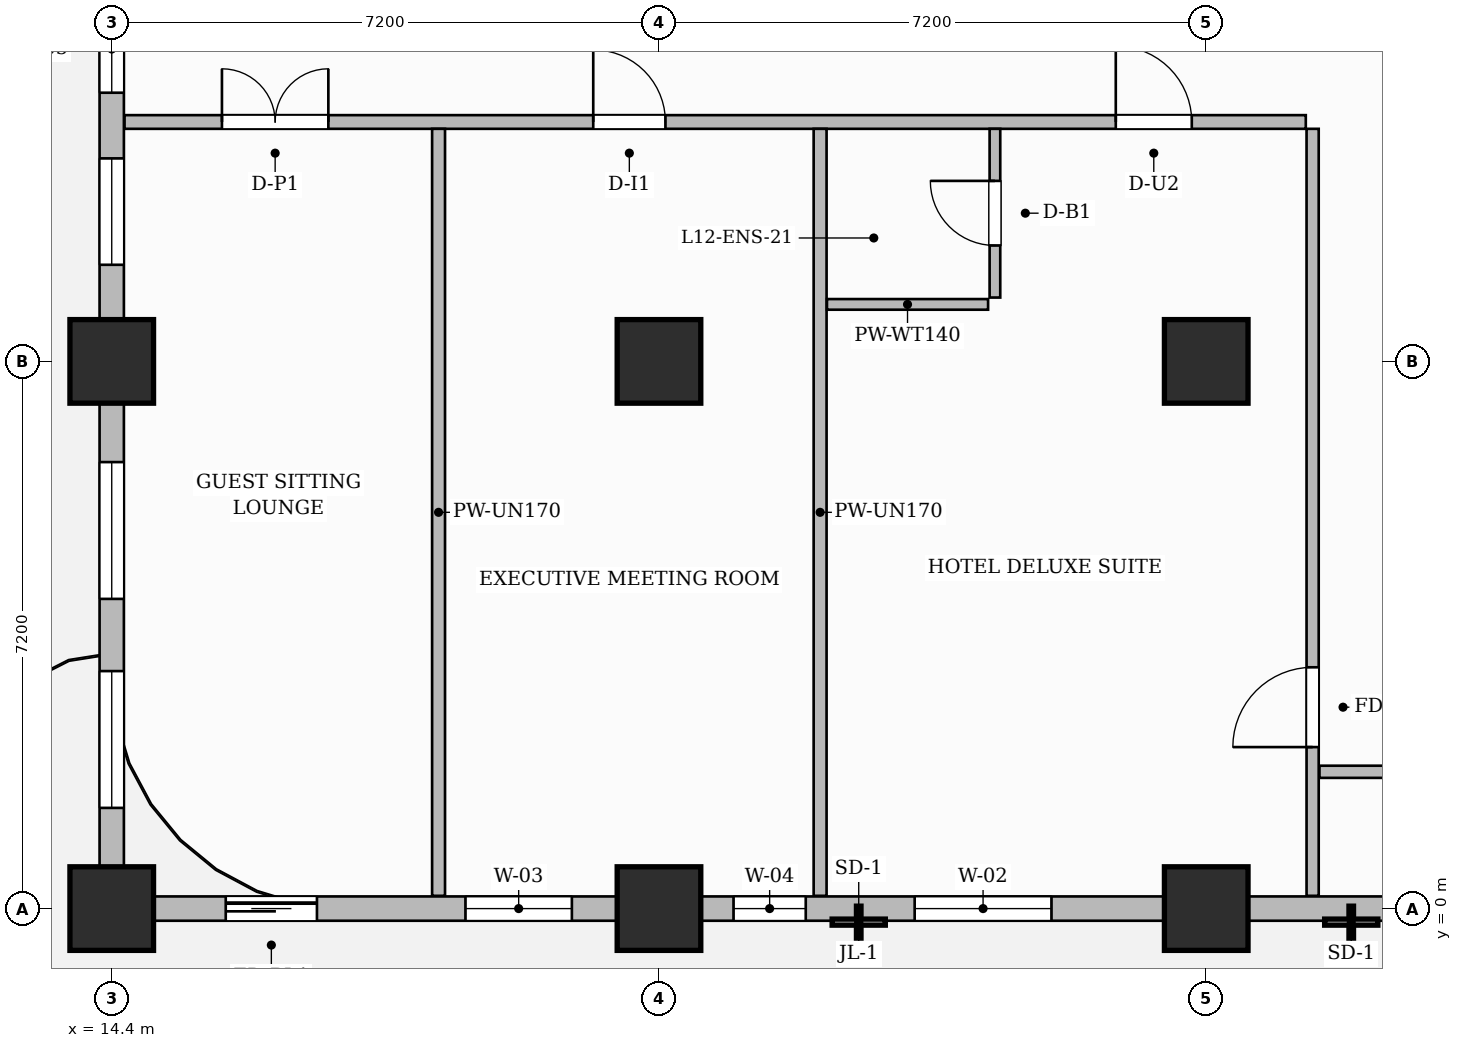
"""IFC4 building model, lengths in metres.
Left out: names, types, materials, properties, quantities, classifications, styles, units other than length and angle.
Written with IfcOpenShell. Run it as: python <this file> out.ifc"""

import sys

from ifc_helpers import new_model, si_unit, direction, frame, frame_2d, origin, origin_2d, place, context, subcontext, project, spatial, rectangle, extrude, source, transform, mapped, element, fill, save


model = new_model("IFC4")
c1 = context("Model", 3, precision=1e-05, world=origin(), true_north=direction((0.0, 1.0)))
c2 = subcontext(c1, "Body", "Model", "MODEL_VIEW")
j1 = project(units=[si_unit("LENGTHUNIT", "METRE"), si_unit("PLANEANGLEUNIT", "RADIAN")], contexts=[c1])
p1 = place(None, origin())
s1 = spatial("IfcSite", under=j1, at=p1, CompositionType="ELEMENT")
p2 = place(p1, origin())
s2 = spatial("IfcBuilding", under=s1, at=p2, CompositionType="ELEMENT")
p3 = place(p2, frame((0.0, 0.0, 54.6)))
s3 = spatial("IfcBuildingStorey", under=s2, at=p3, CompositionType="ELEMENT", Elevation=54.6)
m1 = source(origin(), c2, "Body", "SweptSolid", [
    extrude(rectangle(XDim=1.1, YDim=1.1, at=origin_2d()), origin(), (0.0, 0.0, 1.0), 3.7),
])
for number, where, z_axis, x_axis in (
    (1, (14.4, 0.0, 0.0), (0.0, 0.0, 1.0), (1.0, 0.0, 0.0)),
    (2, (14.4, 7.2, 0.0), (0.0, 0.0, 1.0), (1.0, 0.0, 0.0)),
    (3, (21.6, 0.0, 0.0), (0.0, 0.0, 1.0), (1.0, 0.0, 0.0)),
    (4, (21.6, 7.2, 0.0), (0.0, 0.0, 1.0), (1.0, 0.0, 0.0)),
    (5, (28.8, 0.0, 0.0), (0.0, 0.0, 1.0), (1.0, 0.0, 0.0)),
    (6, (28.8, 7.2, 0.0), (0.0, 0.0, 1.0), (1.0, 0.0, 0.0)),
):
    element("IfcColumn", number, at=place(p3, frame(where, z_axis=z_axis, x_axis=x_axis)), inside=s3, PredefinedType="COLUMN", context=c2, shape_type="MappedRepresentation", body=[
        mapped(m1, transform((0.0, 0.0, 0.0), scale=1.0)),
    ])
p4 = place(p3, frame((14.568, 10.35, 0.0), z_axis=(0.0, 0.0, 1.0), x_axis=(1.0, 0.0, 0.0)))
e7 = element("IfcWall", 7, at=p4, inside=s3, PredefinedType="PARTITIONING", context=c2, shape_type="SweptSolid", body=[
    extrude(rectangle(XDim=15.542, YDim=0.18, at=frame_2d((7.771, 0.0))), origin(), (0.0, 0.0, 1.0), 3.45),
])
p5 = place(p4, frame((1.282, 0.0, 0.0)))
e8 = element("IfcOpeningElement", 8, at=p5, cuts=e7, PredefinedType="OPENING", context=c2, shape_type="SweptSolid", body=[
    extrude(rectangle(XDim=1.4, YDim=2.35, at=frame_2d((0.7, 1.175))), frame((0.0, 0.1, 0.0), z_axis=(0.0, -1.0, 0.0), x_axis=(1.0, 0.0, 0.0)), (0.0, 0.0, 1.0), 0.2),
])
p6 = place(p4, frame((6.167, 0.0, 0.0)))
e9 = element("IfcOpeningElement", 9, at=p6, cuts=e7, PredefinedType="OPENING", context=c2, shape_type="SweptSolid", body=[
    extrude(rectangle(XDim=0.95, YDim=2.15, at=frame_2d((0.475, 1.075))), frame((0.0, 0.1, 0.0), z_axis=(0.0, -1.0, 0.0), x_axis=(1.0, 0.0, 0.0)), (0.0, 0.0, 1.0), 0.2),
])
p7 = place(p4, frame((13.042, 0.0, 0.0)))
e10 = element("IfcOpeningElement", 10, at=p7, cuts=e7, PredefinedType="OPENING", context=c2, shape_type="SweptSolid", body=[
    extrude(rectangle(XDim=1.0, YDim=2.2, at=frame_2d((0.5, 1.1))), frame((0.0, 0.1, 0.0), z_axis=(0.0, -1.0, 0.0), x_axis=(1.0, 0.0, 0.0)), (0.0, 0.0, 1.0), 0.2),
])
p8 = place(p3, frame((30.2, 0.168, 0.0), z_axis=(0.0, 0.0, 1.0), x_axis=(0.0, 1.0, 0.0)))
e11 = element("IfcWall", 11, at=p8, inside=s3, PredefinedType="PARTITIONING", context=c2, shape_type="SweptSolid", body=[
    extrude(rectangle(XDim=10.092, YDim=0.16, at=frame_2d((5.046, 0.0))), origin(), (0.0, 0.0, 1.0), 3.45),
])
p9 = place(p8, frame((1.957, 0.0, 0.0)))
e12 = element("IfcOpeningElement", 12, at=p9, cuts=e11, PredefinedType="OPENING", context=c2, shape_type="SweptSolid", body=[
    extrude(rectangle(XDim=1.05, YDim=2.15, at=frame_2d((0.525, 1.075))), frame((0.0, 0.09, 0.0), z_axis=(0.0, -1.0, 0.0), x_axis=(1.0, 0.0, 0.0)), (0.0, 0.0, 1.0), 0.18),
])
p10 = place(p3, frame((30.29, 1.8, 0.0), z_axis=(0.0, 0.0, 1.0), x_axis=(1.0, 0.0, 0.0)))
e13 = element("IfcWall", 13, at=p10, inside=s3, PredefinedType="PARTITIONING", context=c2, shape_type="SweptSolid", body=[
    extrude(rectangle(XDim=19.37, YDim=0.16, at=frame_2d((9.685, 0.0))), origin(), (0.0, 0.0, 1.0), 3.45),
])
p11 = place(p10, frame((2.916, 0.0, 0.0)))
e14 = element("IfcOpeningElement", 14, at=p11, cuts=e13, PredefinedType="OPENING", context=c2, shape_type="SweptSolid", body=[
    extrude(rectangle(XDim=0.9, YDim=2.15, at=frame_2d((0.45, 1.075))), frame((0.0, 0.09, 0.0), z_axis=(0.0, -1.0, 0.0), x_axis=(1.0, 0.0, 0.0)), (0.0, 0.0, 1.0), 0.18),
])
p12 = place(p10, frame((9.66, 0.0, 0.0)))
e15 = element("IfcOpeningElement", 15, at=p12, cuts=e13, PredefinedType="OPENING", context=c2, shape_type="SweptSolid", body=[
    extrude(rectangle(XDim=0.9, YDim=2.15, at=frame_2d((0.45, 1.075))), frame((0.0, 0.09, 0.0), z_axis=(0.0, -1.0, 0.0), x_axis=(1.0, 0.0, 0.0)), (0.0, 0.0, 1.0), 0.18),
])
p13 = place(p10, frame((15.86, 0.0, 0.0)))
e16 = element("IfcOpeningElement", 16, at=p13, cuts=e13, PredefinedType="OPENING", context=c2, shape_type="SweptSolid", body=[
    extrude(rectangle(XDim=0.9, YDim=2.15, at=frame_2d((0.45, 1.075))), frame((0.0, 0.09, 0.0), z_axis=(0.0, -1.0, 0.0), x_axis=(1.0, 0.0, 0.0)), (0.0, 0.0, 1.0), 0.18),
])
for number, where, z_axis, x_axis in (
    (17, (18.7, 0.168, 0.0), (0.0, 0.0, 1.0), (0.0, 1.0, 0.0)),
    (18, (23.72, 0.168, 0.0), (0.0, 0.0, 1.0), (0.0, 1.0, 0.0)),
):
    element("IfcWall", number, at=place(p3, frame(where, z_axis=z_axis, x_axis=x_axis)), inside=s3, PredefinedType="PARTITIONING", context=c2, shape_type="SweptSolid", body=[
        extrude(rectangle(XDim=10.092, YDim=0.17, at=frame_2d((5.046, 0.0))), origin(), (0.0, 0.0, 1.0), 3.45),
    ])
p14 = place(p3, frame((26.02, 8.04, 0.0), z_axis=(0.0, 0.0, 1.0), x_axis=(0.0, 1.0, 0.0)))
e19 = element("IfcWall", 19, at=p14, inside=s3, PredefinedType="PARTITIONING", context=c2, shape_type="SweptSolid", body=[
    extrude(rectangle(XDim=2.22, YDim=0.14, at=frame_2d((1.11, 0.0))), origin(), (0.0, 0.0, 1.0), 3.45),
])
p15 = place(p14, frame((0.685, 0.0, 0.0)))
e20 = element("IfcOpeningElement", 20, at=p15, cuts=e19, PredefinedType="OPENING", context=c2, shape_type="SweptSolid", body=[
    extrude(rectangle(XDim=0.85, YDim=2.1, at=frame_2d((0.425, 1.05))), frame((0.0, 0.08, 0.0), z_axis=(0.0, -1.0, 0.0), x_axis=(1.0, 0.0, 0.0)), (0.0, 0.0, 1.0), 0.16),
])
p16 = place(p3, frame((23.81, 7.95, 0.0), z_axis=(0.0, 0.0, 1.0), x_axis=(1.0, 0.0, 0.0)))
e21 = element("IfcWall", 21, at=p16, inside=s3, PredefinedType="PARTITIONING", context=c2, shape_type="SweptSolid", body=[
    extrude(rectangle(XDim=2.12, YDim=0.14, at=frame_2d((1.06, 0.0))), origin(), (0.0, 0.0, 1.0), 3.45),
])
p17 = place(p3, frame((14.4, 0.0, 0.0), z_axis=(0.0, 0.0, 1.0), x_axis=(1.0, 0.0, 0.0)))
e22 = element("IfcWall", 22, at=p17, inside=s3, PredefinedType="SOLIDWALL", context=c2, shape_type="SweptSolid", body=[
    extrude(rectangle(XDim=43.2, YDim=0.32, at=frame_2d((21.6, 0.0))), origin(), (0.0, 0.0, 1.0), 2.885),
])
p18 = place(p17, frame((1.5, 0.0, 0.0)))
e23 = element("IfcOpeningElement", 23, at=p18, cuts=e22, PredefinedType="OPENING", context=c2, shape_type="SweptSolid", body=[
    extrude(rectangle(XDim=1.2, YDim=2.2, at=frame_2d((0.6, 1.1))), frame((0.0, 0.17, 0.0), z_axis=(0.0, -1.0, 0.0), x_axis=(1.0, 0.0, 0.0)), (0.0, 0.0, 1.0), 0.34),
])
p19 = place(p17, frame((4.654, 0.0, 0.8)))
e24 = element("IfcOpeningElement", 24, at=p19, cuts=e22, PredefinedType="OPENING", context=c2, shape_type="SweptSolid", body=[
    extrude(rectangle(XDim=1.4, YDim=1.85, at=frame_2d((0.7, 0.925))), frame((0.0, 0.17, 0.0), z_axis=(0.0, -1.0, 0.0), x_axis=(1.0, 0.0, 0.0)), (0.0, 0.0, 1.0), 0.34),
])
p20 = place(p17, frame((8.181, 0.0, 0.8)))
e25 = element("IfcOpeningElement", 25, at=p20, cuts=e22, PredefinedType="OPENING", context=c2, shape_type="SweptSolid", body=[
    extrude(rectangle(XDim=0.95, YDim=1.75, at=frame_2d((0.475, 0.875))), frame((0.0, 0.17, 0.0), z_axis=(0.0, -1.0, 0.0), x_axis=(1.0, 0.0, 0.0)), (0.0, 0.0, 1.0), 0.34),
])
p21 = place(p17, frame((10.564, 0.0, 0.8)))
e26 = element("IfcOpeningElement", 26, at=p21, cuts=e22, PredefinedType="OPENING", context=c2, shape_type="SweptSolid", body=[
    extrude(rectangle(XDim=1.8, YDim=1.85, at=frame_2d((0.9, 0.925))), frame((0.0, 0.17, 0.0), z_axis=(0.0, -1.0, 0.0), x_axis=(1.0, 0.0, 0.0)), (0.0, 0.0, 1.0), 0.34),
])
p22 = place(p17, frame((16.804, 0.0, 0.8)))
e27 = element("IfcOpeningElement", 27, at=p22, cuts=e22, PredefinedType="OPENING", context=c2, shape_type="SweptSolid", body=[
    extrude(rectangle(XDim=1.8, YDim=1.85, at=frame_2d((0.9, 0.925))), frame((0.0, 0.17, 0.0), z_axis=(0.0, -1.0, 0.0), x_axis=(1.0, 0.0, 0.0)), (0.0, 0.0, 1.0), 0.34),
])
p23 = place(p17, frame((21.521, 0.0, 0.8)))
e28 = element("IfcOpeningElement", 28, at=p23, cuts=e22, PredefinedType="OPENING", context=c2, shape_type="SweptSolid", body=[
    extrude(rectangle(XDim=0.95, YDim=1.75, at=frame_2d((0.475, 0.875))), frame((0.0, 0.17, 0.0), z_axis=(0.0, -1.0, 0.0), x_axis=(1.0, 0.0, 0.0)), (0.0, 0.0, 1.0), 0.34),
])
p24 = place(p17, frame((23.904, 0.0, 0.8)))
e29 = element("IfcOpeningElement", 29, at=p24, cuts=e22, PredefinedType="OPENING", context=c2, shape_type="SweptSolid", body=[
    extrude(rectangle(XDim=1.8, YDim=1.85, at=frame_2d((0.9, 0.925))), frame((0.0, 0.17, 0.0), z_axis=(0.0, -1.0, 0.0), x_axis=(1.0, 0.0, 0.0)), (0.0, 0.0, 1.0), 0.34),
])
p25 = place(p17, frame((29.681, 0.0, 0.8)))
e30 = element("IfcOpeningElement", 30, at=p25, cuts=e22, PredefinedType="OPENING", context=c2, shape_type="SweptSolid", body=[
    extrude(rectangle(XDim=1.8, YDim=1.85, at=frame_2d((0.9, 0.925))), frame((0.0, 0.17, 0.0), z_axis=(0.0, -1.0, 0.0), x_axis=(1.0, 0.0, 0.0)), (0.0, 0.0, 1.0), 0.34),
])
p26 = place(p17, frame((32.327, 0.0, 0.8)))
e31 = element("IfcOpeningElement", 31, at=p26, cuts=e22, PredefinedType="OPENING", context=c2, shape_type="SweptSolid", body=[
    extrude(rectangle(XDim=1.8, YDim=1.85, at=frame_2d((0.9, 0.925))), frame((0.0, 0.17, 0.0), z_axis=(0.0, -1.0, 0.0), x_axis=(1.0, 0.0, 0.0)), (0.0, 0.0, 1.0), 0.34),
])
p27 = place(p17, frame((36.875, 0.0, 0.8)))
e32 = element("IfcOpeningElement", 32, at=p27, cuts=e22, PredefinedType="OPENING", context=c2, shape_type="SweptSolid", body=[
    extrude(rectangle(XDim=1.8, YDim=1.85, at=frame_2d((0.9, 0.925))), frame((0.0, 0.17, 0.0), z_axis=(0.0, -1.0, 0.0), x_axis=(1.0, 0.0, 0.0)), (0.0, 0.0, 1.0), 0.34),
])
p28 = place(p17, frame((39.925, 0.0, 0.8)))
e33 = element("IfcOpeningElement", 33, at=p28, cuts=e22, PredefinedType="OPENING", context=c2, shape_type="SweptSolid", body=[
    extrude(rectangle(XDim=1.8, YDim=1.85, at=frame_2d((0.9, 0.925))), frame((0.0, 0.17, 0.0), z_axis=(0.0, -1.0, 0.0), x_axis=(1.0, 0.0, 0.0)), (0.0, 0.0, 1.0), 0.34),
])
p29 = place(p3, frame((14.4, 0.05, 0.0), z_axis=(0.0, 0.0, 1.0), x_axis=(0.0, 1.0, 0.0)))
e34 = element("IfcWall", 34, at=p29, inside=s3, PredefinedType="SOLIDWALL", context=c2, shape_type="SweptSolid", body=[
    extrude(rectangle(XDim=21.5, YDim=0.32, at=frame_2d((10.75, 0.0))), origin(), (0.0, 0.0, 1.0), 2.885),
])
p30 = place(p29, frame((1.275, 0.0, 0.8)))
e35 = element("IfcOpeningElement", 35, at=p30, cuts=e34, PredefinedType="OPENING", context=c2, shape_type="SweptSolid", body=[
    extrude(rectangle(XDim=1.8, YDim=1.85, at=frame_2d((0.9, 0.925))), frame((0.0, 0.17, 0.0), z_axis=(0.0, -1.0, 0.0), x_axis=(1.0, 0.0, 0.0)), (0.0, 0.0, 1.0), 0.34),
])
p31 = place(p29, frame((4.025, 0.0, 0.8)))
e36 = element("IfcOpeningElement", 36, at=p31, cuts=e34, PredefinedType="OPENING", context=c2, shape_type="SweptSolid", body=[
    extrude(rectangle(XDim=1.8, YDim=1.85, at=frame_2d((0.9, 0.925))), frame((0.0, 0.17, 0.0), z_axis=(0.0, -1.0, 0.0), x_axis=(1.0, 0.0, 0.0)), (0.0, 0.0, 1.0), 0.34),
])
p32 = place(p29, frame((8.421, 0.0, 0.8)))
e37 = element("IfcOpeningElement", 37, at=p32, cuts=e34, PredefinedType="OPENING", context=c2, shape_type="SweptSolid", body=[
    extrude(rectangle(XDim=1.4, YDim=1.85, at=frame_2d((0.7, 0.925))), frame((0.0, 0.17, 0.0), z_axis=(0.0, -1.0, 0.0), x_axis=(1.0, 0.0, 0.0)), (0.0, 0.0, 1.0), 0.34),
])
p33 = place(p29, frame((10.685, 0.0, 0.8)))
e38 = element("IfcOpeningElement", 38, at=p33, cuts=e34, PredefinedType="OPENING", context=c2, shape_type="SweptSolid", body=[
    extrude(rectangle(XDim=1.15, YDim=1.8, at=frame_2d((0.575, 0.9))), frame((0.0, 0.17, 0.0), z_axis=(0.0, -1.0, 0.0), x_axis=(1.0, 0.0, 0.0)), (0.0, 0.0, 1.0), 0.34),
])
p34 = place(p29, frame((12.414, 0.0, 0.8)))
e39 = element("IfcOpeningElement", 39, at=p34, cuts=e34, PredefinedType="OPENING", context=c2, shape_type="SweptSolid", body=[
    extrude(rectangle(XDim=0.95, YDim=1.75, at=frame_2d((0.475, 0.875))), frame((0.0, 0.17, 0.0), z_axis=(0.0, -1.0, 0.0), x_axis=(1.0, 0.0, 0.0)), (0.0, 0.0, 1.0), 0.34),
])
p35 = place(p29, frame((15.675, 0.0, 0.8)))
e40 = element("IfcOpeningElement", 40, at=p35, cuts=e34, PredefinedType="OPENING", context=c2, shape_type="SweptSolid", body=[
    extrude(rectangle(XDim=1.8, YDim=1.85, at=frame_2d((0.9, 0.925))), frame((0.0, 0.17, 0.0), z_axis=(0.0, -1.0, 0.0), x_axis=(1.0, 0.0, 0.0)), (0.0, 0.0, 1.0), 0.34),
])
p36 = place(p29, frame((18.425, 0.0, 0.8)))
e41 = element("IfcOpeningElement", 41, at=p36, cuts=e34, PredefinedType="OPENING", context=c2, shape_type="SweptSolid", body=[
    extrude(rectangle(XDim=1.8, YDim=1.85, at=frame_2d((0.9, 0.925))), frame((0.0, 0.17, 0.0), z_axis=(0.0, -1.0, 0.0), x_axis=(1.0, 0.0, 0.0)), (0.0, 0.0, 1.0), 0.34),
])
m2 = source(origin(), c2, "Body", "SweptSolid", [
    extrude(rectangle(XDim=1.05, YDim=2.15, at=frame_2d((0.525, 1.075))), frame((0.0, 0.025, 0.0), z_axis=(0.0, -1.0, 0.0), x_axis=(1.0, 0.0, 0.0)), (0.0, 0.0, 1.0), 0.05),
])
p37 = place(p9, origin())
e42 = element("IfcDoor", 42, at=p37, inside=s3, OperationType="SINGLE_SWING_LEFT", PredefinedType="DOOR", context=c2, shape_type="MappedRepresentation", body=[
    mapped(m2, transform((0.0, 0.0, 0.0), scale=1.0)),
])
fill(e12, e42)
m3 = source(origin(), c2, "Body", "SweptSolid", [
    extrude(rectangle(XDim=1.4, YDim=2.35, at=frame_2d((0.7, 1.175))), frame((0.0, 0.025, 0.0), z_axis=(0.0, -1.0, 0.0), x_axis=(1.0, 0.0, 0.0)), (0.0, 0.0, 1.0), 0.05),
])
p38 = place(p5, origin())
e43 = element("IfcDoor", 43, at=p38, inside=s3, OperationType="DOUBLE_DOOR_SINGLE_SWING", PredefinedType="DOOR", context=c2, shape_type="MappedRepresentation", body=[
    mapped(m3, transform((0.0, 0.0, 0.0), scale=1.0)),
])
fill(e8, e43)
m4 = source(origin(), c2, "Body", "SweptSolid", [
    extrude(rectangle(XDim=0.95, YDim=2.15, at=frame_2d((0.475, 1.075))), frame((0.0, 0.025, 0.0), z_axis=(0.0, -1.0, 0.0), x_axis=(1.0, 0.0, 0.0)), (0.0, 0.0, 1.0), 0.05),
])
p39 = place(p6, origin())
e44 = element("IfcDoor", 44, at=p39, inside=s3, OperationType="SINGLE_SWING_LEFT", PredefinedType="DOOR", context=c2, shape_type="MappedRepresentation", body=[
    mapped(m4, transform((0.0, 0.0, 0.0), scale=1.0)),
])
fill(e9, e44)
m5 = source(origin(), c2, "Body", "SweptSolid", [
    extrude(rectangle(XDim=0.85, YDim=2.1, at=frame_2d((0.425, 1.05))), frame((0.0, 0.025, 0.0), z_axis=(0.0, -1.0, 0.0), x_axis=(1.0, 0.0, 0.0)), (0.0, 0.0, 1.0), 0.05),
])
p40 = place(p15, origin())
e45 = element("IfcDoor", 45, at=p40, inside=s3, OperationType="SINGLE_SWING_RIGHT", PredefinedType="DOOR", context=c2, shape_type="MappedRepresentation", body=[
    mapped(m5, transform((0.0, 0.0, 0.0), scale=1.0)),
])
fill(e20, e45)
m6 = source(origin(), c2, "Body", "SweptSolid", [
    extrude(rectangle(XDim=1.0, YDim=2.2, at=frame_2d((0.5, 1.1))), frame((0.0, 0.025, 0.0), z_axis=(0.0, -1.0, 0.0), x_axis=(1.0, 0.0, 0.0)), (0.0, 0.0, 1.0), 0.05),
])
p41 = place(p7, origin())
e46 = element("IfcDoor", 46, at=p41, inside=s3, OperationType="SINGLE_SWING_LEFT", PredefinedType="DOOR", context=c2, shape_type="MappedRepresentation", body=[
    mapped(m6, transform((0.0, 0.0, 0.0), scale=1.0)),
])
fill(e10, e46)
m7 = source(origin(), c2, "Body", "SweptSolid", [
    extrude(rectangle(XDim=1.2, YDim=2.2, at=frame_2d((0.6, 1.1))), frame((0.0, 0.025, 0.0), z_axis=(0.0, -1.0, 0.0), x_axis=(1.0, 0.0, 0.0)), (0.0, 0.0, 1.0), 0.05),
])
p42 = place(p18, origin())
e47 = element("IfcDoor", 47, at=p42, inside=s3, OperationType="SLIDING_TO_LEFT", PredefinedType="DOOR", context=c2, shape_type="MappedRepresentation", body=[
    mapped(m7, transform((0.0, 0.0, 0.0), scale=1.0)),
])
fill(e23, e47)
m8 = source(origin(), c2, "Body", "SweptSolid", [
    extrude(rectangle(XDim=1.4, YDim=1.85, at=frame_2d((0.7, 0.925))), frame((0.0, 0.03, 0.0), z_axis=(0.0, -1.0, 0.0), x_axis=(1.0, 0.0, 0.0)), (0.0, 0.0, 1.0), 0.06),
])
p43 = place(p19, origin())
e48 = element("IfcWindow", 48, at=p43, inside=s3, PartitioningType="SINGLE_PANEL", PredefinedType="WINDOW", context=c2, shape_type="MappedRepresentation", body=[
    mapped(m8, transform((0.0, 0.0, 0.0), scale=1.0)),
])
fill(e24, e48)
m9 = source(origin(), c2, "Body", "SweptSolid", [
    extrude(rectangle(XDim=0.95, YDim=1.75, at=frame_2d((0.475, 0.875))), frame((0.0, 0.03, 0.0), z_axis=(0.0, -1.0, 0.0), x_axis=(1.0, 0.0, 0.0)), (0.0, 0.0, 1.0), 0.06),
])
p44 = place(p20, origin())
e49 = element("IfcWindow", 49, at=p44, inside=s3, PartitioningType="SINGLE_PANEL", PredefinedType="WINDOW", context=c2, shape_type="MappedRepresentation", body=[
    mapped(m9, transform((0.0, 0.0, 0.0), scale=1.0)),
])
fill(e25, e49)
m10 = source(origin(), c2, "Body", "SweptSolid", [
    extrude(rectangle(XDim=1.8, YDim=1.85, at=frame_2d((0.9, 0.925))), frame((0.0, 0.03, 0.0), z_axis=(0.0, -1.0, 0.0), x_axis=(1.0, 0.0, 0.0)), (0.0, 0.0, 1.0), 0.06),
])
p45 = place(p21, origin())
e50 = element("IfcWindow", 50, at=p45, inside=s3, PartitioningType="DOUBLE_PANEL_VERTICAL", PredefinedType="WINDOW", context=c2, shape_type="MappedRepresentation", body=[
    mapped(m10, transform((0.0, 0.0, 0.0), scale=1.0)),
])
fill(e26, e50)
p46 = place(p30, origin())
e51 = element("IfcWindow", 51, at=p46, inside=s3, PartitioningType="DOUBLE_PANEL_VERTICAL", PredefinedType="WINDOW", context=c2, shape_type="MappedRepresentation", body=[
    mapped(m10, transform((0.0, 0.0, 0.0), scale=1.0)),
])
fill(e35, e51)
p47 = place(p31, origin())
e52 = element("IfcWindow", 52, at=p47, inside=s3, PartitioningType="DOUBLE_PANEL_VERTICAL", PredefinedType="WINDOW", context=c2, shape_type="MappedRepresentation", body=[
    mapped(m10, transform((0.0, 0.0, 0.0), scale=1.0)),
])
fill(e36, e52)
p48 = place(p32, origin())
e53 = element("IfcWindow", 53, at=p48, inside=s3, PartitioningType="SINGLE_PANEL", PredefinedType="WINDOW", context=c2, shape_type="MappedRepresentation", body=[
    mapped(m8, transform((0.0, 0.0, 0.0), scale=1.0)),
])
fill(e37, e53)
m11 = source(origin(), c2, "Body", "SweptSolid", [
    extrude(rectangle(XDim=1.15, YDim=1.8, at=frame_2d((0.575, 0.9))), frame((0.0, 0.03, 0.0), z_axis=(0.0, -1.0, 0.0), x_axis=(1.0, 0.0, 0.0)), (0.0, 0.0, 1.0), 0.06),
])
p49 = place(p33, origin())
e54 = element("IfcWindow", 54, at=p49, inside=s3, PartitioningType="SINGLE_PANEL", PredefinedType="WINDOW", context=c2, shape_type="MappedRepresentation", body=[
    mapped(m11, transform((0.0, 0.0, 0.0), scale=1.0)),
])
fill(e38, e54)
save(model, sys.argv[1])
